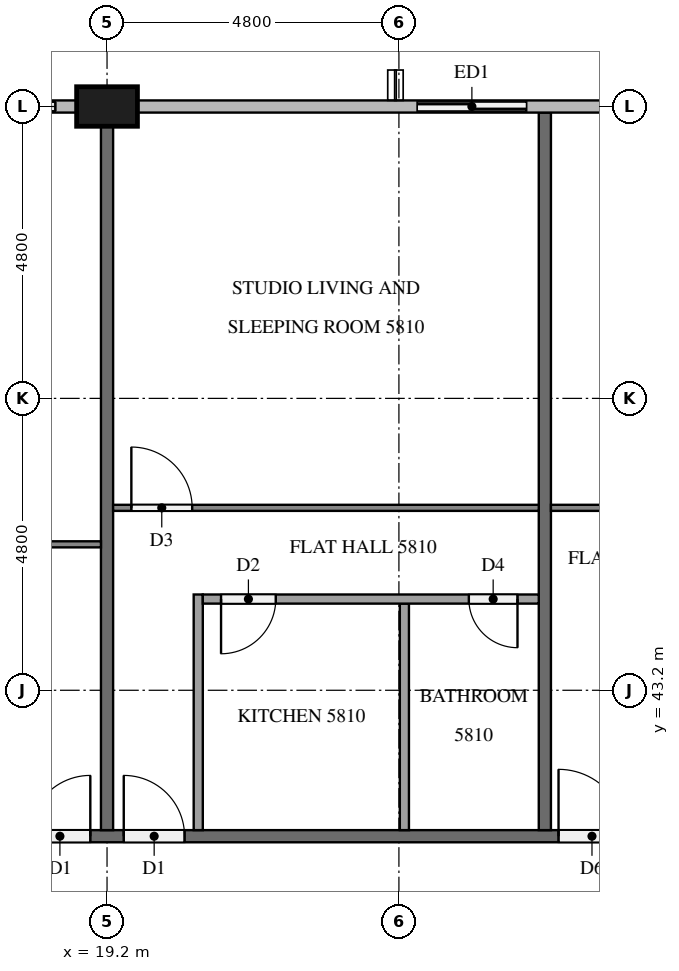
"""IFC4 building model, lengths in metres.
Left out: names, types, materials, properties, quantities, classifications, styles, units other than length and angle.
Written with IfcOpenShell. Run it as: python <this file> out.ifc"""

import sys

from ifc_helpers import new_model, si_unit, direction, frame, frame_2d, origin, origin_2d, place, context, subcontext, project, spatial, rectangle, extrude, element, fill, save


model = new_model("IFC4")
c1 = context("Model", 3, precision=1e-05, world=origin(), true_north=direction((0.0, 1.0)))
c2 = subcontext(c1, "Body", "Model", "MODEL_VIEW")
j1 = project(units=[si_unit("LENGTHUNIT", "METRE"), si_unit("PLANEANGLEUNIT", "RADIAN")], contexts=[c1])
p1 = place(None, origin())
s1 = spatial("IfcSite", under=j1, at=p1, CompositionType="ELEMENT")
p2 = place(p1, origin())
s2 = spatial("IfcBuilding", under=s1, at=p2, CompositionType="ELEMENT")
p3 = place(p2, frame((0.0, 0.0, 222.8)))
s3 = spatial("IfcBuildingStorey", under=s2, at=p3, CompositionType="ELEMENT", Elevation=222.8)
p4 = place(p3, frame((19.2, 52.8, 0.0), z_axis=(0.0, 0.0, 1.0), x_axis=(1.0, 0.0, 0.0)))
e1 = element("IfcColumn", 1, at=p4, inside=s3, PredefinedType="COLUMN", context=c2, shape_type="SweptSolid", body=[
    extrude(rectangle(XDim=1.0, YDim=0.65, at=origin_2d()), origin(), (0.0, 0.0, 1.0), 3.2),
])
p5 = place(p3, frame((26.4, 52.8, 0.0), z_axis=(0.0, 0.0, 1.0), x_axis=(-1.0, 0.0, 0.0)))
e2 = element("IfcWall", 2, at=p5, inside=s3, PredefinedType="SOLIDWALL", context=c2, shape_type="SweptSolid", body=[
    extrude(rectangle(XDim=2.4, YDim=0.15, at=frame_2d((1.2, 0.0))), origin(), (0.0, 0.0, 1.0), 3.2),
])
p6 = place(p5, frame((0.3, 0.0, 0.0)))
e3 = element("IfcOpeningElement", 3, at=p6, cuts=e2, PredefinedType="OPENING", context=c2, shape_type="SweptSolid", body=[
    extrude(rectangle(XDim=1.8, YDim=2.4, at=frame_2d((0.9, 1.2))), frame((0.0, 0.085, 0.0), z_axis=(0.0, -1.0, 0.0), x_axis=(1.0, 0.0, 0.0)), (0.0, 0.0, 1.0), 0.17),
])
p7 = place(p3, frame((18.7, 52.8, 0.0), z_axis=(0.0, 0.0, 1.0), x_axis=(-1.0, 0.0, 0.0)))
e4 = element("IfcWall", 4, at=p7, inside=s3, PredefinedType="SOLIDWALL", context=c2, shape_type="SweptSolid", body=[
    extrude(rectangle(XDim=1.9, YDim=0.15, at=frame_2d((0.95, 0.0))), origin(), (0.0, 0.0, 1.0), 3.2),
])
p8 = place(p7, frame((0.35, 0.0, 0.9)))
e5 = element("IfcOpeningElement", 5, at=p8, cuts=e4, PredefinedType="OPENING", context=c2, shape_type="SweptSolid", body=[
    extrude(rectangle(XDim=1.2, YDim=1.4, at=frame_2d((0.6, 0.7))), frame((0.0, 0.085, 0.0), z_axis=(0.0, -1.0, 0.0), x_axis=(1.0, 0.0, 0.0)), (0.0, 0.0, 1.0), 0.17),
])
p9 = place(p3, frame((11.9, 40.8, 0.0), z_axis=(0.0, 0.0, 1.0), x_axis=(1.0, 0.0, 0.0)))
e6 = element("IfcWall", 6, at=p9, inside=s3, PredefinedType="PARTITIONING", context=c2, shape_type="SweptSolid", body=[
    extrude(rectangle(XDim=38.6, YDim=0.2, at=frame_2d((19.3, 0.0))), origin(), (0.0, 0.0, 1.0), 3.2),
])
p10 = place(p9, frame((33.975, 0.0, 0.0)))
e7 = element("IfcOpeningElement", 7, at=p10, cuts=e6, PredefinedType="OPENING", context=c2, shape_type="SweptSolid", body=[
    extrude(rectangle(XDim=1.0, YDim=2.1, at=frame_2d((0.5, 1.05))), frame((0.0, 0.11, 0.0), z_axis=(0.0, -1.0, 0.0), x_axis=(1.0, 0.0, 0.0)), (0.0, 0.0, 1.0), 0.22),
])
p11 = place(p9, frame((14.725, 0.0, 0.0)))
e8 = element("IfcOpeningElement", 8, at=p11, cuts=e6, PredefinedType="OPENING", context=c2, shape_type="SweptSolid", body=[
    extrude(rectangle(XDim=1.1, YDim=2.1, at=frame_2d((0.55, 1.05))), frame((0.0, 0.11, 0.0), z_axis=(0.0, -1.0, 0.0), x_axis=(1.0, 0.0, 0.0)), (0.0, 0.0, 1.0), 0.22),
])
p12 = place(p9, frame((7.575, 0.0, 0.0)))
e9 = element("IfcOpeningElement", 9, at=p12, cuts=e6, PredefinedType="OPENING", context=c2, shape_type="SweptSolid", body=[
    extrude(rectangle(XDim=1.0, YDim=2.1, at=frame_2d((0.5, 1.05))), frame((0.0, 0.11, 0.0), z_axis=(0.0, -1.0, 0.0), x_axis=(1.0, 0.0, 0.0)), (0.0, 0.0, 1.0), 0.22),
])
p13 = place(p9, frame((6.025, 0.0, 0.0)))
e10 = element("IfcOpeningElement", 10, at=p13, cuts=e6, PredefinedType="OPENING", context=c2, shape_type="SweptSolid", body=[
    extrude(rectangle(XDim=1.0, YDim=2.1, at=frame_2d((0.5, 1.05))), frame((0.0, 0.11, 0.0), z_axis=(0.0, -1.0, 0.0), x_axis=(1.0, 0.0, 0.0)), (0.0, 0.0, 1.0), 0.22),
])
p14 = place(p3, frame((26.4, 52.7, 0.0), z_axis=(0.0, 0.0, 1.0), x_axis=(0.0, -1.0, 0.0)))
e11 = element("IfcWall", 11, at=p14, inside=s3, PredefinedType="PARTITIONING", context=c2, shape_type="SweptSolid", body=[
    extrude(rectangle(XDim=11.8, YDim=0.2, at=frame_2d((5.9, 0.0))), origin(), (0.0, 0.0, 1.0), 3.2),
])
p15 = place(p3, frame((19.2, 52.475, 0.0), z_axis=(0.0, 0.0, 1.0), x_axis=(0.0, -1.0, 0.0)))
e12 = element("IfcWall", 12, at=p15, inside=s3, PredefinedType="PARTITIONING", context=c2, shape_type="SweptSolid", body=[
    extrude(rectangle(XDim=11.575, YDim=0.2, at=frame_2d((5.788, 0.0))), origin(), (0.0, 0.0, 1.0), 3.2),
])
p16 = place(p3, frame((26.5, 46.2, 0.0), z_axis=(0.0, 0.0, 1.0), x_axis=(1.0, 0.0, 0.0)))
e13 = element("IfcWall", 13, at=p16, inside=s3, PredefinedType="PARTITIONING", context=c2, shape_type="SweptSolid", body=[
    extrude(rectangle(XDim=19.0, YDim=0.1, at=frame_2d((9.5, 0.0))), origin(), (0.0, 0.0, 1.0), 3.2),
])
p17 = place(p16, frame((3.45, 0.0, 0.0)))
e14 = element("IfcOpeningElement", 14, at=p17, cuts=e13, PredefinedType="OPENING", context=c2, shape_type="SweptSolid", body=[
    extrude(rectangle(XDim=0.9, YDim=2.1, at=frame_2d((0.45, 1.05))), frame((0.0, 0.06, 0.0), z_axis=(0.0, -1.0, 0.0), x_axis=(1.0, 0.0, 0.0)), (0.0, 0.0, 1.0), 0.12),
])
p18 = place(p16, frame((5.05, 0.0, 0.0)))
e15 = element("IfcOpeningElement", 15, at=p18, cuts=e13, PredefinedType="OPENING", context=c2, shape_type="SweptSolid", body=[
    extrude(rectangle(XDim=1.0, YDim=2.1, at=frame_2d((0.5, 1.05))), frame((0.0, 0.06, 0.0), z_axis=(0.0, -1.0, 0.0), x_axis=(1.0, 0.0, 0.0)), (0.0, 0.0, 1.0), 0.12),
])
p19 = place(p16, frame((13.05, 0.0, 0.0)))
e16 = element("IfcOpeningElement", 16, at=p19, cuts=e13, PredefinedType="OPENING", context=c2, shape_type="SweptSolid", body=[
    extrude(rectangle(XDim=0.9, YDim=2.1, at=frame_2d((0.45, 1.05))), frame((0.0, 0.06, 0.0), z_axis=(0.0, -1.0, 0.0), x_axis=(1.0, 0.0, 0.0)), (0.0, 0.0, 1.0), 0.12),
])
p20 = place(p16, frame((14.65, 0.0, 0.0)))
e17 = element("IfcOpeningElement", 17, at=p20, cuts=e13, PredefinedType="OPENING", context=c2, shape_type="SweptSolid", body=[
    extrude(rectangle(XDim=0.9, YDim=2.1, at=frame_2d((0.45, 1.05))), frame((0.0, 0.06, 0.0), z_axis=(0.0, -1.0, 0.0), x_axis=(1.0, 0.0, 0.0)), (0.0, 0.0, 1.0), 0.12),
])
p21 = place(p3, frame((19.3, 46.2, 0.0), z_axis=(0.0, 0.0, 1.0), x_axis=(1.0, 0.0, 0.0)))
e18 = element("IfcWall", 18, at=p21, inside=s3, PredefinedType="PARTITIONING", context=c2, shape_type="SweptSolid", body=[
    extrude(rectangle(XDim=7.0, YDim=0.1, at=frame_2d((3.5, 0.0))), origin(), (0.0, 0.0, 1.0), 3.2),
])
p22 = place(p21, frame((0.3, 0.0, 0.0)))
e19 = element("IfcOpeningElement", 19, at=p22, cuts=e18, PredefinedType="OPENING", context=c2, shape_type="SweptSolid", body=[
    extrude(rectangle(XDim=1.0, YDim=2.1, at=frame_2d((0.5, 1.05))), frame((0.0, 0.06, 0.0), z_axis=(0.0, -1.0, 0.0), x_axis=(1.0, 0.0, 0.0)), (0.0, 0.0, 1.0), 0.12),
])
p23 = place(p3, frame((24.09, 40.9, 0.0), z_axis=(0.0, 0.0, 1.0), x_axis=(0.0, 1.0, 0.0)))
e20 = element("IfcWall", 20, at=p23, inside=s3, PredefinedType="PARTITIONING", context=c2, shape_type="SweptSolid", body=[
    extrude(rectangle(XDim=3.725, YDim=0.15, at=frame_2d((1.863, 0.0))), origin(), (0.0, 0.0, 1.0), 3.2),
])
p24 = place(p3, frame((20.7, 40.9, 0.0), z_axis=(0.0, 0.0, 1.0), x_axis=(0.0, 1.0, 0.0)))
e21 = element("IfcWall", 21, at=p24, inside=s3, PredefinedType="PARTITIONING", context=c2, shape_type="SweptSolid", body=[
    extrude(rectangle(XDim=3.875, YDim=0.15, at=frame_2d((1.938, 0.0))), origin(), (0.0, 0.0, 1.0), 3.2),
])
p25 = place(p3, frame((26.3, 44.7, 0.0), z_axis=(0.0, 0.0, 1.0), x_axis=(-1.0, 0.0, 0.0)))
e22 = element("IfcWall", 22, at=p25, inside=s3, PredefinedType="PARTITIONING", context=c2, shape_type="SweptSolid", body=[
    extrude(rectangle(XDim=5.525, YDim=0.15, at=frame_2d((2.763, 0.0))), origin(), (0.0, 0.0, 1.0), 3.2),
])
p26 = place(p25, frame((4.325, 0.0, 0.0)))
e23 = element("IfcOpeningElement", 23, at=p26, cuts=e22, PredefinedType="OPENING", context=c2, shape_type="SweptSolid", body=[
    extrude(rectangle(XDim=0.9, YDim=2.1, at=frame_2d((0.45, 1.05))), frame((0.0, 0.085, 0.0), z_axis=(0.0, -1.0, 0.0), x_axis=(1.0, 0.0, 0.0)), (0.0, 0.0, 1.0), 0.17),
])
p27 = place(p25, frame((0.35, 0.0, 0.0)))
e24 = element("IfcOpeningElement", 24, at=p27, cuts=e22, PredefinedType="OPENING", context=c2, shape_type="SweptSolid", body=[
    extrude(rectangle(XDim=0.8, YDim=2.1, at=frame_2d((0.4, 1.05))), frame((0.0, 0.085, 0.0), z_axis=(0.0, -1.0, 0.0), x_axis=(1.0, 0.0, 0.0)), (0.0, 0.0, 1.0), 0.17),
])
p28 = place(p3, frame((4.9, 45.6, 0.0), z_axis=(0.0, 0.0, 1.0), x_axis=(1.0, 0.0, 0.0)))
e25 = element("IfcWall", 25, at=p28, inside=s3, PredefinedType="PARTITIONING", context=c2, shape_type="SweptSolid", body=[
    extrude(rectangle(XDim=14.2, YDim=0.1, at=frame_2d((7.1, 0.0))), origin(), (0.0, 0.0, 1.0), 3.2),
])
p29 = place(p28, frame((9.85, 0.0, 0.0)))
e26 = element("IfcOpeningElement", 26, at=p29, cuts=e25, PredefinedType="OPENING", context=c2, shape_type="SweptSolid", body=[
    extrude(rectangle(XDim=0.9, YDim=2.1, at=frame_2d((0.45, 1.05))), frame((0.0, 0.06, 0.0), z_axis=(0.0, -1.0, 0.0), x_axis=(1.0, 0.0, 0.0)), (0.0, 0.0, 1.0), 0.12),
])
p30 = place(p28, frame((8.25, 0.0, 0.0)))
e27 = element("IfcOpeningElement", 27, at=p30, cuts=e25, PredefinedType="OPENING", context=c2, shape_type="SweptSolid", body=[
    extrude(rectangle(XDim=0.9, YDim=2.1, at=frame_2d((0.45, 1.05))), frame((0.0, 0.06, 0.0), z_axis=(0.0, -1.0, 0.0), x_axis=(1.0, 0.0, 0.0)), (0.0, 0.0, 1.0), 0.12),
])
p31 = place(p28, frame((0.3, 0.0, 0.0)))
e28 = element("IfcOpeningElement", 28, at=p31, cuts=e25, PredefinedType="OPENING", context=c2, shape_type="SweptSolid", body=[
    extrude(rectangle(XDim=1.0, YDim=2.1, at=frame_2d((0.5, 1.05))), frame((0.0, 0.06, 0.0), z_axis=(0.0, -1.0, 0.0), x_axis=(1.0, 0.0, 0.0)), (0.0, 0.0, 1.0), 0.12),
])
p32 = place(p6, origin())
e29 = element("IfcDoor", 29, at=p32, inside=s3, OperationType="SLIDING_TO_RIGHT", PredefinedType="DOOR", context=c2, shape_type="SweptSolid", body=[
    extrude(rectangle(XDim=1.8, YDim=2.4, at=frame_2d((0.9, 1.2))), frame((0.0, 0.025, 0.0), z_axis=(0.0, -1.0, 0.0), x_axis=(1.0, 0.0, 0.0)), (0.0, 0.0, 1.0), 0.05),
])
fill(e3, e29)
p33 = place(p8, origin())
e30 = element("IfcWindow", 30, at=p33, inside=s3, PartitioningType="SINGLE_PANEL", PredefinedType="WINDOW", context=c2, shape_type="SweptSolid", body=[
    extrude(rectangle(XDim=1.2, YDim=1.4, at=frame_2d((0.6, 0.7))), frame((0.0, 0.03, 0.0), z_axis=(0.0, -1.0, 0.0), x_axis=(1.0, 0.0, 0.0)), (0.0, 0.0, 1.0), 0.06),
])
fill(e5, e30)
p34 = place(p11, origin())
e31 = element("IfcDoor", 31, at=p34, inside=s3, OperationType="SINGLE_SWING_LEFT", PredefinedType="DOOR", context=c2, shape_type="SweptSolid", body=[
    extrude(rectangle(XDim=1.1, YDim=2.1, at=frame_2d((0.55, 1.05))), frame((0.0, 0.025, 0.0), z_axis=(0.0, -1.0, 0.0), x_axis=(1.0, 0.0, 0.0)), (0.0, 0.0, 1.0), 0.05),
])
fill(e8, e31)
p35 = place(p12, origin())
e32 = element("IfcDoor", 32, at=p35, inside=s3, OperationType="SINGLE_SWING_LEFT", PredefinedType="DOOR", context=c2, shape_type="SweptSolid", body=[
    extrude(rectangle(XDim=1.0, YDim=2.1, at=frame_2d((0.5, 1.05))), frame((0.0, 0.025, 0.0), z_axis=(0.0, -1.0, 0.0), x_axis=(1.0, 0.0, 0.0)), (0.0, 0.0, 1.0), 0.05),
])
fill(e9, e32)
p36 = place(p13, origin())
e33 = element("IfcDoor", 33, at=p36, inside=s3, OperationType="SINGLE_SWING_RIGHT", PredefinedType="DOOR", context=c2, shape_type="SweptSolid", body=[
    extrude(rectangle(XDim=1.0, YDim=2.1, at=frame_2d((0.5, 1.05))), frame((0.0, 0.025, 0.0), z_axis=(0.0, -1.0, 0.0), x_axis=(1.0, 0.0, 0.0)), (0.0, 0.0, 1.0), 0.05),
])
fill(e10, e33)
p37 = place(p22, origin())
e34 = element("IfcDoor", 34, at=p37, inside=s3, OperationType="SINGLE_SWING_LEFT", PredefinedType="DOOR", context=c2, shape_type="SweptSolid", body=[
    extrude(rectangle(XDim=1.0, YDim=2.1, at=frame_2d((0.5, 1.05))), frame((0.0, 0.025, 0.0), z_axis=(0.0, -1.0, 0.0), x_axis=(1.0, 0.0, 0.0)), (0.0, 0.0, 1.0), 0.05),
])
fill(e19, e34)
p38 = place(p26, origin())
e35 = element("IfcDoor", 35, at=p38, inside=s3, OperationType="SINGLE_SWING_RIGHT", PredefinedType="DOOR", context=c2, shape_type="SweptSolid", body=[
    extrude(rectangle(XDim=0.9, YDim=2.1, at=frame_2d((0.45, 1.05))), frame((0.0, 0.025, 0.0), z_axis=(0.0, -1.0, 0.0), x_axis=(1.0, 0.0, 0.0)), (0.0, 0.0, 1.0), 0.05),
])
fill(e23, e35)
p39 = place(p27, origin())
e36 = element("IfcDoor", 36, at=p39, inside=s3, OperationType="SINGLE_SWING_LEFT", PredefinedType="DOOR", context=c2, shape_type="SweptSolid", body=[
    extrude(rectangle(XDim=0.8, YDim=2.1, at=frame_2d((0.4, 1.05))), frame((0.0, 0.025, 0.0), z_axis=(0.0, -1.0, 0.0), x_axis=(1.0, 0.0, 0.0)), (0.0, 0.0, 1.0), 0.05),
])
fill(e24, e36)
save(model, sys.argv[1])
